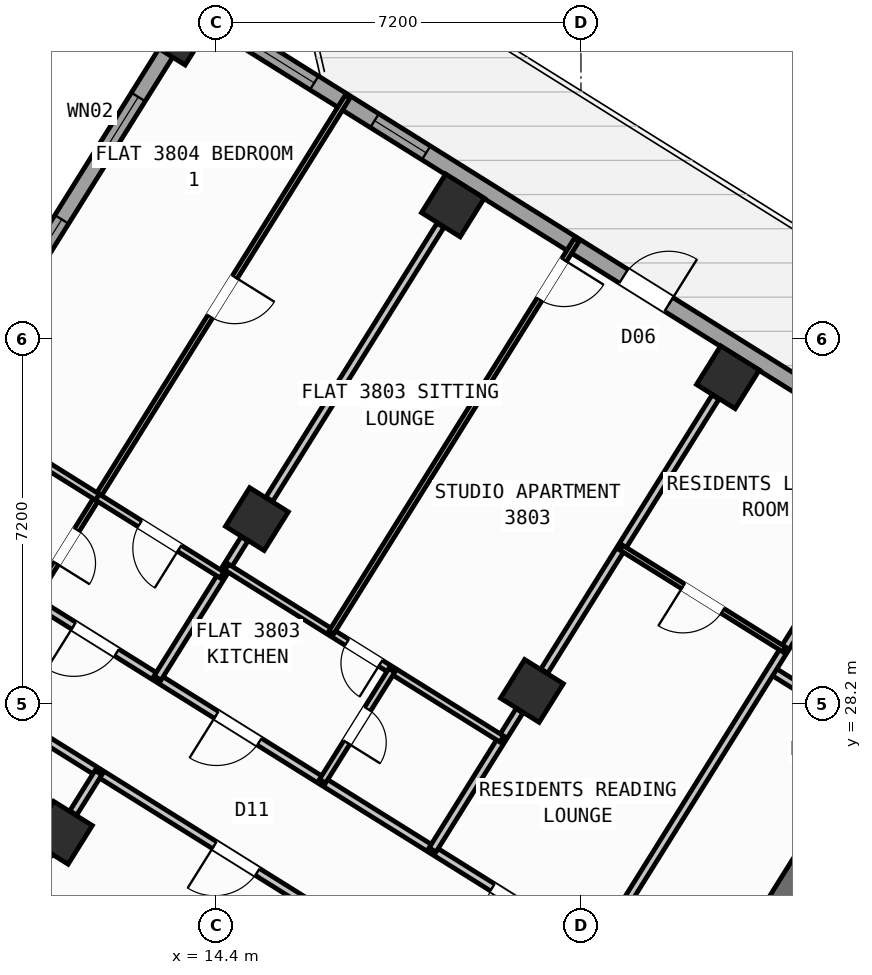
"""IFC4 building model, lengths in metres.
Left out: names, types, materials, properties, quantities, classifications, styles, units other than length and angle.
Written with IfcOpenShell. Run it as: python <this file> out.ifc"""

import sys

from ifc_helpers import new_model, si_unit, direction, frame, frame_2d, origin, origin_2d, place, context, subcontext, project, spatial, rectangle, hollow_rectangle, extrude, source, transform, mapped, element, fill, save


model = new_model("IFC4")
c1 = context("Model", 3, precision=1e-05, world=origin(), true_north=direction((0.0, 1.0)))
c2 = subcontext(c1, "Body", "Model", "MODEL_VIEW")
j1 = project(units=[si_unit("LENGTHUNIT", "METRE"), si_unit("PLANEANGLEUNIT", "RADIAN")], contexts=[c1])
p1 = place(None, origin())
s1 = spatial("IfcSite", under=j1, at=p1, CompositionType="ELEMENT")
p2 = place(p1, origin())
s2 = spatial("IfcBuilding", under=s1, at=p2, CompositionType="ELEMENT")
p3 = place(p2, frame((0.0, 0.0, 151.5)))
s3 = spatial("IfcBuildingStorey", under=s2, at=p3, CompositionType="ELEMENT", Elevation=151.5)
p4 = place(p3, frame((26.007, 24.976, 0.0), z_axis=(0.0, 0.0, 1.0), x_axis=(-0.529923795287, -0.848045264823, 0.0)))
e1 = element("IfcWall", 1, at=p4, inside=s3, PredefinedType="SHEAR", context=c2, shape_type="SweptSolid", body=[
    extrude(rectangle(XDim=6.425, YDim=0.55, at=frame_2d((3.212, 0.0))), origin(), (0.0, 0.0, 1.0), 3.35),
])
m1 = source(origin(), c2, "Body", "SweptSolid", [
    extrude(hollow_rectangle(XDim=0.9, YDim=0.9, WallThickness=0.036, at=origin_2d()), origin(), (0.0, 0.0, 1.0), 3.6),
])
for number, where, z_axis, x_axis in (
    (2, (24.5, 34.643, 0.0), (0.0, 0.0, 1.0), (-0.848, 0.53, 0.0)),
    (3, (20.632, 28.452, 0.0), (0.0, 0.0, 1.0), (-0.848, 0.53, 0.0)),
    (4, (19.073, 38.034, 0.0), (0.0, 0.0, 1.0), (-0.848, 0.53, 0.0)),
    (5, (15.205, 31.844, 0.0), (0.0, 0.0, 1.0), (-0.848, 0.53, 0.0)),
    (6, (11.336, 25.653, 0.0), (0.0, 0.0, 1.0), (-0.848, 0.53, 0.0)),
    (7, (13.646, 41.426, 0.0), (0.0, 0.0, 1.0), (-0.848, 0.53, 0.0)),
):
    element("IfcColumn", number, at=place(p3, frame(where, z_axis=z_axis, x_axis=x_axis)), inside=s3, PredefinedType="COLUMN", context=c2, shape_type="MappedRepresentation", body=[
        mapped(m1, transform((0.0, 0.0, 0.0), scale=1.0)),
    ])
p5 = place(p3, frame((2.415, 23.452, 0.0), z_axis=(0.0, 0.0, 1.0), x_axis=(0.52991049553, 0.848053575387, 0.0)))
e8 = element("IfcWall", 8, at=p5, inside=s3, PredefinedType="STANDARD", context=c2, shape_type="SweptSolid", body=[
    extrude(rectangle(XDim=21.587, YDim=0.32, at=frame_2d((10.794, 0.0))), origin(), (0.0, 0.0, 1.0), 2.775),
])
p6 = place(p5, frame((1.406, 0.0, 0.8)))
e9 = element("IfcOpeningElement", 9, at=p6, cuts=e8, PredefinedType="OPENING", context=c2, shape_type="SweptSolid", body=[
    extrude(rectangle(XDim=2.1, YDim=1.55, at=frame_2d((1.05, 0.775))), frame((0.0, 0.17, 0.0), z_axis=(0.0, -1.0, 0.0), x_axis=(1.0, 0.0, 0.0)), (0.0, 0.0, 1.0), 0.34),
])
p7 = place(p5, frame((10.949, 0.0, 1.0)))
e10 = element("IfcOpeningElement", 10, at=p7, cuts=e8, PredefinedType="OPENING", context=c2, shape_type="SweptSolid", body=[
    extrude(rectangle(XDim=0.9, YDim=1.25, at=frame_2d((0.45, 0.625))), frame((0.0, 0.17, 0.0), z_axis=(0.0, -1.0, 0.0), x_axis=(1.0, 0.0, 0.0)), (0.0, 0.0, 1.0), 0.34),
])
p8 = place(p5, frame((15.369, 0.0, 0.85)))
e11 = element("IfcOpeningElement", 11, at=p8, cuts=e8, PredefinedType="OPENING", context=c2, shape_type="SweptSolid", body=[
    extrude(rectangle(XDim=1.5, YDim=1.5, at=frame_2d((0.75, 0.75))), frame((0.0, 0.17, 0.0), z_axis=(0.0, -1.0, 0.0), x_axis=(1.0, 0.0, 0.0)), (0.0, 0.0, 1.0), 0.34),
])
p9 = place(p5, frame((18.219, 0.0, 0.85)))
e12 = element("IfcOpeningElement", 12, at=p9, cuts=e8, PredefinedType="OPENING", context=c2, shape_type="SweptSolid", body=[
    extrude(rectangle(XDim=1.5, YDim=1.5, at=frame_2d((0.75, 0.75))), frame((0.0, 0.17, 0.0), z_axis=(0.0, -1.0, 0.0), x_axis=(1.0, 0.0, 0.0)), (0.0, 0.0, 1.0), 0.34),
])
p10 = place(p3, frame((14.138, 41.825, 0.0), z_axis=(0.0, 0.0, 1.0), x_axis=(0.848046498049, -0.529921821731, 0.0)))
e13 = element("IfcWall", 13, at=p10, inside=s3, PredefinedType="STANDARD", context=c2, shape_type="SweptSolid", body=[
    extrude(rectangle(XDim=31.588, YDim=0.32, at=frame_2d((15.794, 0.0))), origin(), (0.0, 0.0, 1.0), 3.35),
])
p11 = place(p10, frame((9.792, 0.0, 0.0)))
e14 = element("IfcOpeningElement", 14, at=p11, cuts=e13, PredefinedType="OPENING", context=c2, shape_type="SweptSolid", body=[
    extrude(rectangle(XDim=1.05, YDim=2.15, at=frame_2d((0.525, 1.075))), frame((0.0, 0.17, 0.0), z_axis=(0.0, -1.0, 0.0), x_axis=(1.0, 0.0, 0.0)), (0.0, 0.0, 1.0), 0.34),
])
p12 = place(p10, frame((0.791, 0.0, 0.85)))
e15 = element("IfcOpeningElement", 15, at=p12, cuts=e13, PredefinedType="OPENING", context=c2, shape_type="SweptSolid", body=[
    extrude(rectangle(XDim=1.8, YDim=1.5, at=frame_2d((0.9, 0.75))), frame((0.0, 0.17, 0.0), z_axis=(0.0, -1.0, 0.0), x_axis=(1.0, 0.0, 0.0)), (0.0, 0.0, 1.0), 0.34),
])
p13 = place(p10, frame((3.996, 0.0, 0.95)))
e16 = element("IfcOpeningElement", 16, at=p13, cuts=e13, PredefinedType="OPENING", context=c2, shape_type="SweptSolid", body=[
    extrude(rectangle(XDim=1.2, YDim=1.4, at=frame_2d((0.6, 0.7))), frame((0.0, 0.17, 0.0), z_axis=(0.0, -1.0, 0.0), x_axis=(1.0, 0.0, 0.0)), (0.0, 0.0, 1.0), 0.34),
])
p14 = place(p10, frame((13.874, 0.0, 0.85)))
e17 = element("IfcOpeningElement", 17, at=p14, cuts=e13, PredefinedType="OPENING", context=c2, shape_type="SweptSolid", body=[
    extrude(rectangle(XDim=1.5, YDim=1.5, at=frame_2d((0.75, 0.75))), frame((0.0, 0.17, 0.0), z_axis=(0.0, -1.0, 0.0), x_axis=(1.0, 0.0, 0.0)), (0.0, 0.0, 1.0), 0.34),
])
p15 = place(p10, frame((17.104, 0.0, 1.0)))
e18 = element("IfcOpeningElement", 18, at=p15, cuts=e13, PredefinedType="OPENING", context=c2, shape_type="SweptSolid", body=[
    extrude(rectangle(XDim=0.9, YDim=1.25, at=frame_2d((0.45, 0.625))), frame((0.0, 0.17, 0.0), z_axis=(0.0, -1.0, 0.0), x_axis=(1.0, 0.0, 0.0)), (0.0, 0.0, 1.0), 0.34),
])
p16 = place(p10, frame((22.069, 0.0, 1.0)))
e19 = element("IfcOpeningElement", 19, at=p16, cuts=e13, PredefinedType="OPENING", context=c2, shape_type="SweptSolid", body=[
    extrude(rectangle(XDim=0.9, YDim=1.25, at=frame_2d((0.45, 0.625))), frame((0.0, 0.17, 0.0), z_axis=(0.0, -1.0, 0.0), x_axis=(1.0, 0.0, 0.0)), (0.0, 0.0, 1.0), 0.34),
])
p17 = place(p10, frame((27.519, 0.0, 1.0)))
e20 = element("IfcOpeningElement", 20, at=p17, cuts=e13, PredefinedType="OPENING", context=c2, shape_type="SweptSolid", body=[
    extrude(rectangle(XDim=0.9, YDim=1.25, at=frame_2d((0.45, 0.625))), frame((0.0, 0.17, 0.0), z_axis=(0.0, -1.0, 0.0), x_axis=(1.0, 0.0, 0.0)), (0.0, 0.0, 1.0), 0.34),
])
p18 = place(p3, frame((27.57, 27.478, 0.0), z_axis=(0.0, 0.0, 1.0), x_axis=(-0.848050851465, 0.529914854792, 0.0)))
e21 = element("IfcWall", 21, at=p18, inside=s3, PredefinedType="PARTITIONING", context=c2, shape_type="SweptSolid", body=[
    extrude(rectangle(XDim=2.61, YDim=0.16, at=frame_2d((1.305, 0.0))), origin(), (0.0, 0.0, 1.0), 3.34),
])
p19 = place(p18, frame((0.95, 0.0, 0.0)))
e22 = element("IfcOpeningElement", 22, at=p19, cuts=e21, PredefinedType="OPENING", context=c2, shape_type="SweptSolid", body=[
    extrude(rectangle(XDim=0.86, YDim=2.05, at=frame_2d((0.43, 1.025))), frame((0.0, 0.09, 0.0), z_axis=(0.0, -1.0, 0.0), x_axis=(1.0, 0.0, 0.0)), (0.0, 0.0, 1.0), 0.18),
])
p20 = place(p3, frame((27.953, 33.016, 0.0), z_axis=(0.0, 0.0, 1.0), x_axis=(-0.529905022231, -0.848056995381, 0.0)))
e23 = element("IfcWall", 23, at=p20, inside=s3, PredefinedType="PARTITIONING", context=c2, shape_type="SweptSolid", body=[
    extrude(rectangle(XDim=11.45, YDim=0.16, at=frame_2d((5.725, 0.0))), origin(), (0.0, 0.0, 1.0), 3.34),
])
p21 = place(p3, frame((21.885, 23.306, 0.0), z_axis=(0.0, 0.0, 1.0), x_axis=(-0.848052408131, 0.529912363569, 0.0)))
e24 = element("IfcWall", 24, at=p21, inside=s3, PredefinedType="PARTITIONING", context=c2, shape_type="SweptSolid", body=[
    extrude(rectangle(XDim=16.73, YDim=0.16, at=frame_2d((8.365, 0.0))), origin(), (0.0, 0.0, 1.0), 3.34),
])
p22 = place(p21, frame((1.395, 0.0, 0.0)))
e25 = element("IfcOpeningElement", 25, at=p22, cuts=e24, PredefinedType="OPENING", context=c2, shape_type="SweptSolid", body=[
    extrude(rectangle(XDim=1.0, YDim=2.1, at=frame_2d((0.5, 1.05))), frame((0.0, 0.09, 0.0), z_axis=(0.0, -1.0, 0.0), x_axis=(1.0, 0.0, 0.0)), (0.0, 0.0, 1.0), 0.18),
])
p23 = place(p21, frame((7.82, 0.0, 0.0)))
e26 = element("IfcOpeningElement", 26, at=p23, cuts=e24, PredefinedType="OPENING", context=c2, shape_type="SweptSolid", body=[
    extrude(rectangle(XDim=1.0, YDim=2.1, at=frame_2d((0.5, 1.05))), frame((0.0, 0.09, 0.0), z_axis=(0.0, -1.0, 0.0), x_axis=(1.0, 0.0, 0.0)), (0.0, 0.0, 1.0), 0.18),
])
p24 = place(p21, frame((11.14, 0.0, 0.0)))
e27 = element("IfcOpeningElement", 27, at=p24, cuts=e24, PredefinedType="OPENING", context=c2, shape_type="SweptSolid", body=[
    extrude(rectangle(XDim=1.0, YDim=2.1, at=frame_2d((0.5, 1.05))), frame((0.0, 0.09, 0.0), z_axis=(0.0, -1.0, 0.0), x_axis=(1.0, 0.0, 0.0)), (0.0, 0.0, 1.0), 0.18),
])
p25 = place(p3, frame((20.719, 21.44, 0.0), z_axis=(0.0, 0.0, 1.0), x_axis=(-0.848048310262, 0.529918921593, 0.0)))
e28 = element("IfcWall", 28, at=p25, inside=s3, PredefinedType="PARTITIONING", context=c2, shape_type="SweptSolid", body=[
    extrude(rectangle(XDim=16.73, YDim=0.16, at=frame_2d((8.365, 0.0))), origin(), (0.0, 0.0, 1.0), 3.34),
])
p26 = place(p25, frame((2.22, 0.0, 0.0)))
e29 = element("IfcOpeningElement", 29, at=p26, cuts=e28, PredefinedType="OPENING", context=c2, shape_type="SweptSolid", body=[
    extrude(rectangle(XDim=0.86, YDim=2.05, at=frame_2d((0.43, 1.025))), frame((0.0, 0.09, 0.0), z_axis=(0.0, -1.0, 0.0), x_axis=(1.0, 0.0, 0.0)), (0.0, 0.0, 1.0), 0.18),
])
p27 = place(p25, frame((6.49, 0.0, 0.0)))
e30 = element("IfcOpeningElement", 30, at=p27, cuts=e28, PredefinedType="OPENING", context=c2, shape_type="SweptSolid", body=[
    extrude(rectangle(XDim=1.0, YDim=2.1, at=frame_2d((0.5, 1.05))), frame((0.0, 0.09, 0.0), z_axis=(0.0, -1.0, 0.0), x_axis=(1.0, 0.0, 0.0)), (0.0, 0.0, 1.0), 0.18),
])
p28 = place(p25, frame((14.304, 0.0, 0.0)))
e31 = element("IfcOpeningElement", 31, at=p28, cuts=e28, PredefinedType="OPENING", context=c2, shape_type="SweptSolid", body=[
    extrude(rectangle(XDim=1.0, YDim=2.1, at=frame_2d((0.5, 1.05))), frame((0.0, 0.09, 0.0), z_axis=(0.0, -1.0, 0.0), x_axis=(1.0, 0.0, 0.0)), (0.0, 0.0, 1.0), 0.18),
])
p29 = place(p3, frame((12.078, 26.84, 0.0), z_axis=(0.0, 0.0, 1.0), x_axis=(-0.529952145338, -0.848027548876, 0.0)))
e32 = element("IfcWall", 32, at=p29, inside=s3, PredefinedType="PARTITIONING", context=c2, shape_type="SweptSolid", body=[
    extrude(rectangle(XDim=0.938, YDim=0.16, at=frame_2d((0.469, 0.0))), origin(), (0.0, 0.0, 1.0), 2.775),
])
p30 = place(p3, frame((24.256, 34.251, 0.0), z_axis=(0.0, 0.0, 1.0), x_axis=(-0.529919772691, -0.848047778437, 0.0)))
e33 = element("IfcWall", 33, at=p30, inside=s3, PredefinedType="PARTITIONING", context=c2, shape_type="SweptSolid", body=[
    extrude(rectangle(XDim=6.376, YDim=0.16, at=frame_2d((3.188, 0.0))), origin(), (0.0, 0.0, 1.0), 2.775),
])
p31 = place(p3, frame((20.387, 28.06, 0.0), z_axis=(0.0, 0.0, 1.0), x_axis=(-0.529890499457, -0.848066069705, 0.0)))
e34 = element("IfcWall", 34, at=p31, inside=s3, PredefinedType="PARTITIONING", context=c2, shape_type="SweptSolid", body=[
    extrude(rectangle(XDim=3.238, YDim=0.16, at=frame_2d((1.619, 0.0))), origin(), (0.0, 0.0, 1.0), 2.775),
])
p32 = place(p3, frame((25.612, 29.269, 0.0), z_axis=(0.0, 0.0, 1.0), x_axis=(-0.84803087207, 0.529946827537, 0.0)))
e35 = element("IfcWall", 35, at=p32, inside=s3, PredefinedType="PARTITIONING", context=c2, shape_type="SweptSolid", body=[
    extrude(rectangle(XDim=3.79, YDim=0.11, at=frame_2d((1.895, 0.0))), origin(), (0.0, 0.0, 1.0), 3.34),
])
p33 = place(p32, frame((1.435, 0.0, 0.0)))
e36 = element("IfcOpeningElement", 36, at=p33, cuts=e35, PredefinedType="OPENING", context=c2, shape_type="SweptSolid", body=[
    extrude(rectangle(XDim=0.92, YDim=2.08, at=frame_2d((0.46, 1.04))), frame((0.0, 0.065, 0.0), z_axis=(0.0, -1.0, 0.0), x_axis=(1.0, 0.0, 0.0)), (0.0, 0.0, 1.0), 0.13),
])
p34 = place(p3, frame((18.828, 37.643, 0.0), z_axis=(0.0, 0.0, 1.0), x_axis=(-0.529930102756, -0.848041323399, 0.0)))
e37 = element("IfcWall", 37, at=p34, inside=s3, PredefinedType="PARTITIONING", context=c2, shape_type="SweptSolid", body=[
    extrude(rectangle(XDim=6.376, YDim=0.16, at=frame_2d((3.188, 0.0))), origin(), (0.0, 0.0, 1.0), 2.775),
])
p35 = place(p3, frame((14.96, 31.452, 0.0), z_axis=(0.0, 0.0, 1.0), x_axis=(-0.529924383291, -0.848044897393, 0.0)))
e38 = element("IfcWall", 38, at=p35, inside=s3, PredefinedType="PARTITIONING", context=c2, shape_type="SweptSolid", body=[
    extrude(rectangle(XDim=3.238, YDim=0.16, at=frame_2d((1.619, 0.0))), origin(), (0.0, 0.0, 1.0), 2.775),
])
p36 = place(p3, frame((20.039, 27.502, 0.0), z_axis=(0.0, 0.0, 1.0), x_axis=(-0.848039019877, 0.529933789039, 0.0)))
e39 = element("IfcWall", 39, at=p36, inside=s3, PredefinedType="PLUMBINGWALL", context=c2, shape_type="SweptSolid", body=[
    extrude(rectangle(XDim=6.4, YDim=0.14, at=frame_2d((3.2, 0.0))), origin(), (0.0, 0.0, 1.0), 3.34),
])
p37 = place(p36, frame((2.824, 0.0, 0.0)))
e40 = element("IfcOpeningElement", 40, at=p37, cuts=e39, PredefinedType="OPENING", context=c2, shape_type="SweptSolid", body=[
    extrude(rectangle(XDim=0.78, YDim=2.05, at=frame_2d((0.39, 1.025))), frame((0.0, 0.08, 0.0), z_axis=(0.0, -1.0, 0.0), x_axis=(1.0, 0.0, 0.0)), (0.0, 0.0, 1.0), 0.16),
])
p38 = place(p3, frame((17.867, 28.859, 0.0), z_axis=(0.0, 0.0, 1.0), x_axis=(-0.529913878929, -0.848051461244, 0.0)))
e41 = element("IfcWall", 41, at=p38, inside=s3, PredefinedType="PLUMBINGWALL", context=c2, shape_type="SweptSolid", body=[
    extrude(rectangle(XDim=2.58, YDim=0.14, at=frame_2d((1.29, 0.0))), origin(), (0.0, 0.0, 1.0), 3.34),
])
p39 = place(p38, frame((0.9, 0.0, 0.0)))
e42 = element("IfcOpeningElement", 42, at=p39, cuts=e41, PredefinedType="OPENING", context=c2, shape_type="SweptSolid", body=[
    extrude(rectangle(XDim=0.78, YDim=2.05, at=frame_2d((0.39, 1.025))), frame((0.0, 0.08, 0.0), z_axis=(0.0, -1.0, 0.0), x_axis=(1.0, 0.0, 0.0)), (0.0, 0.0, 1.0), 0.16),
])
p40 = place(p3, frame((21.517, 37.356, 0.0), z_axis=(0.0, 0.0, 1.0), x_axis=(-0.529919705034, -0.848047820713, 0.0)))
e43 = element("IfcWall", 43, at=p40, inside=s3, PredefinedType="PARTITIONING", context=c2, shape_type="SweptSolid", body=[
    extrude(rectangle(XDim=9.14, YDim=0.11, at=frame_2d((4.57, 0.0))), origin(), (0.0, 0.0, 1.0), 3.34),
])
p41 = place(p40, frame((0.47, 0.0, 0.0)))
e44 = element("IfcOpeningElement", 44, at=p41, cuts=e43, PredefinedType="OPENING", context=c2, shape_type="SweptSolid", body=[
    extrude(rectangle(XDim=0.92, YDim=2.08, at=frame_2d((0.46, 1.04))), frame((0.0, 0.065, 0.0), z_axis=(0.0, -1.0, 0.0), x_axis=(1.0, 0.0, 0.0)), (0.0, 0.0, 1.0), 0.13),
])
p42 = place(p3, frame((16.995, 40.182, 0.0), z_axis=(0.0, 0.0, 1.0), x_axis=(-0.529927783988, -0.848042772363, 0.0)))
e45 = element("IfcWall", 45, at=p42, inside=s3, PredefinedType="PARTITIONING", context=c2, shape_type="SweptSolid", body=[
    extrude(rectangle(XDim=11.72, YDim=0.11, at=frame_2d((5.86, 0.0))), origin(), (0.0, 0.0, 1.0), 3.34),
])
p43 = place(p42, frame((10.08, 0.0, 0.0)))
e46 = element("IfcOpeningElement", 46, at=p43, cuts=e45, PredefinedType="OPENING", context=c2, shape_type="SweptSolid", body=[
    extrude(rectangle(XDim=0.78, YDim=2.05, at=frame_2d((0.39, 1.025))), frame((0.0, 0.065, 0.0), z_axis=(0.0, -1.0, 0.0), x_axis=(1.0, 0.0, 0.0)), (0.0, 0.0, 1.0), 0.13),
])
p44 = place(p42, frame((4.2, 0.0, 0.0)))
e47 = element("IfcOpeningElement", 47, at=p44, cuts=e45, PredefinedType="OPENING", context=c2, shape_type="SweptSolid", body=[
    extrude(rectangle(XDim=0.92, YDim=2.08, at=frame_2d((0.46, 1.04))), frame((0.0, 0.065, 0.0), z_axis=(0.0, -1.0, 0.0), x_axis=(1.0, 0.0, 0.0)), (0.0, 0.0, 1.0), 0.13),
])
p45 = place(p3, frame((14.516, 30.741, 0.0), z_axis=(0.0, 0.0, 1.0), x_axis=(-0.848059786386, 0.529900555496, 0.0)))
e48 = element("IfcWall", 48, at=p45, inside=s3, PredefinedType="PLUMBINGWALL", context=c2, shape_type="SweptSolid", body=[
    extrude(rectangle(XDim=2.9, YDim=0.14, at=frame_2d((1.45, 0.0))), origin(), (0.0, 0.0, 1.0), 3.34),
])
p46 = place(p45, frame((0.99, 0.0, 0.0)))
e49 = element("IfcOpeningElement", 49, at=p46, cuts=e48, PredefinedType="OPENING", context=c2, shape_type="SweptSolid", body=[
    extrude(rectangle(XDim=0.92, YDim=2.08, at=frame_2d((0.46, 1.04))), frame((0.0, 0.08, 0.0), z_axis=(0.0, -1.0, 0.0), x_axis=(1.0, 0.0, 0.0)), (0.0, 0.0, 1.0), 0.16),
])
p47 = place(p3, frame((12.056, 32.278, 0.0), z_axis=(0.0, 0.0, 1.0), x_axis=(-0.848039976902, 0.529932257535, 0.0)))
e50 = element("IfcWall", 50, at=p47, inside=s3, PredefinedType="PLUMBINGWALL", context=c2, shape_type="SweptSolid", body=[
    extrude(rectangle(XDim=3.62, YDim=0.14, at=frame_2d((1.81, 0.0))), origin(), (0.0, 0.0, 1.0), 3.34),
])
m2 = source(origin(), c2, "Body", "SweptSolid", [
    extrude(rectangle(XDim=1.05, YDim=2.15, at=frame_2d((0.525, 1.075))), frame((0.0, 0.025, 0.0), z_axis=(0.0, -1.0, 0.0), x_axis=(1.0, 0.0, 0.0)), (0.0, 0.0, 1.0), 0.05),
])
p48 = place(p11, origin())
e51 = element("IfcDoor", 51, at=p48, inside=s3, OperationType="SINGLE_SWING_RIGHT", PredefinedType="DOOR", context=c2, shape_type="MappedRepresentation", body=[
    mapped(m2, transform((0.0, 0.0, 0.0), scale=1.0)),
])
fill(e14, e51)
m3 = source(origin(), c2, "Body", "SweptSolid", [
    extrude(rectangle(XDim=1.5, YDim=1.5, at=frame_2d((0.75, 0.75))), frame((0.0, 0.03, 0.0), z_axis=(0.0, -1.0, 0.0), x_axis=(1.0, 0.0, 0.0)), (0.0, 0.0, 1.0), 0.06),
])
p49 = place(p8, origin())
e52 = element("IfcWindow", 52, at=p49, inside=s3, PartitioningType="SINGLE_PANEL", PredefinedType="WINDOW", context=c2, shape_type="MappedRepresentation", body=[
    mapped(m3, transform((0.0, 0.0, 0.0), scale=1.0)),
])
fill(e11, e52)
p50 = place(p9, origin())
e53 = element("IfcWindow", 53, at=p50, inside=s3, PartitioningType="SINGLE_PANEL", PredefinedType="WINDOW", context=c2, shape_type="MappedRepresentation", body=[
    mapped(m3, transform((0.0, 0.0, 0.0), scale=1.0)),
])
fill(e12, e53)
m4 = source(origin(), c2, "Body", "SweptSolid", [
    extrude(rectangle(XDim=1.8, YDim=1.5, at=frame_2d((0.9, 0.75))), frame((0.0, 0.03, 0.0), z_axis=(0.0, -1.0, 0.0), x_axis=(1.0, 0.0, 0.0)), (0.0, 0.0, 1.0), 0.06),
])
p51 = place(p12, origin())
e54 = element("IfcWindow", 54, at=p51, inside=s3, PartitioningType="SINGLE_PANEL", PredefinedType="WINDOW", context=c2, shape_type="MappedRepresentation", body=[
    mapped(m4, transform((0.0, 0.0, 0.0), scale=1.0)),
])
fill(e15, e54)
m5 = source(origin(), c2, "Body", "SweptSolid", [
    extrude(rectangle(XDim=1.2, YDim=1.4, at=frame_2d((0.6, 0.7))), frame((0.0, 0.03, 0.0), z_axis=(0.0, -1.0, 0.0), x_axis=(1.0, 0.0, 0.0)), (0.0, 0.0, 1.0), 0.06),
])
p52 = place(p13, origin())
e55 = element("IfcWindow", 55, at=p52, inside=s3, PartitioningType="SINGLE_PANEL", PredefinedType="WINDOW", context=c2, shape_type="MappedRepresentation", body=[
    mapped(m5, transform((0.0, 0.0, 0.0), scale=1.0)),
])
fill(e16, e55)
m6 = source(origin(), c2, "Body", "SweptSolid", [
    extrude(rectangle(XDim=1.0, YDim=2.1, at=frame_2d((0.5, 1.05))), frame((0.0, 0.025, 0.0), z_axis=(0.0, -1.0, 0.0), x_axis=(1.0, 0.0, 0.0)), (0.0, 0.0, 1.0), 0.05),
])
p53 = place(p27, origin())
e56 = element("IfcDoor", 56, at=p53, inside=s3, OperationType="SINGLE_SWING_RIGHT", PredefinedType="DOOR", context=c2, shape_type="MappedRepresentation", body=[
    mapped(m6, transform((0.0, 0.0, 0.0), scale=1.0)),
])
fill(e30, e56)
p54 = place(p22, origin())
e57 = element("IfcDoor", 57, at=p54, inside=s3, OperationType="SINGLE_SWING_LEFT", PredefinedType="DOOR", context=c2, shape_type="MappedRepresentation", body=[
    mapped(m6, transform((0.0, 0.0, 0.0), scale=1.0)),
])
fill(e25, e57)
m7 = source(origin(), c2, "Body", "SweptSolid", [
    extrude(rectangle(XDim=0.92, YDim=2.08, at=frame_2d((0.46, 1.04))), frame((0.0, 0.025, 0.0), z_axis=(0.0, -1.0, 0.0), x_axis=(1.0, 0.0, 0.0)), (0.0, 0.0, 1.0), 0.05),
])
p55 = place(p33, origin())
e58 = element("IfcDoor", 58, at=p55, inside=s3, OperationType="SINGLE_SWING_RIGHT", PredefinedType="DOOR", context=c2, shape_type="MappedRepresentation", body=[
    mapped(m7, transform((0.0, 0.0, 0.0), scale=1.0)),
])
fill(e36, e58)
p56 = place(p41, origin())
e59 = element("IfcDoor", 59, at=p56, inside=s3, OperationType="SINGLE_SWING_LEFT", PredefinedType="DOOR", context=c2, shape_type="MappedRepresentation", body=[
    mapped(m7, transform((0.0, 0.0, 0.0), scale=1.0)),
])
fill(e44, e59)
p57 = place(p23, origin())
e60 = element("IfcDoor", 60, at=p57, inside=s3, OperationType="SINGLE_SWING_RIGHT", PredefinedType="DOOR", context=c2, shape_type="MappedRepresentation", body=[
    mapped(m6, transform((0.0, 0.0, 0.0), scale=1.0)),
])
fill(e26, e60)
m8 = source(origin(), c2, "Body", "SweptSolid", [
    extrude(rectangle(XDim=0.78, YDim=2.05, at=frame_2d((0.39, 1.025))), frame((0.0, 0.025, 0.0), z_axis=(0.0, -1.0, 0.0), x_axis=(1.0, 0.0, 0.0)), (0.0, 0.0, 1.0), 0.05),
])
p58 = place(p37, origin())
e61 = element("IfcDoor", 61, at=p58, inside=s3, OperationType="SINGLE_SWING_LEFT", PredefinedType="DOOR", context=c2, shape_type="MappedRepresentation", body=[
    mapped(m8, transform((0.0, 0.0, 0.0), scale=1.0)),
])
fill(e40, e61)
p59 = place(p39, origin())
e62 = element("IfcDoor", 62, at=p59, inside=s3, OperationType="SINGLE_SWING_RIGHT", PredefinedType="DOOR", context=c2, shape_type="MappedRepresentation", body=[
    mapped(m8, transform((0.0, 0.0, 0.0), scale=1.0)),
])
fill(e42, e62)
p60 = place(p24, origin())
e63 = element("IfcDoor", 63, at=p60, inside=s3, OperationType="SINGLE_SWING_RIGHT", PredefinedType="DOOR", context=c2, shape_type="MappedRepresentation", body=[
    mapped(m6, transform((0.0, 0.0, 0.0), scale=1.0)),
])
fill(e27, e63)
p61 = place(p46, origin())
e64 = element("IfcDoor", 64, at=p61, inside=s3, OperationType="SINGLE_SWING_LEFT", PredefinedType="DOOR", context=c2, shape_type="MappedRepresentation", body=[
    mapped(m7, transform((0.0, 0.0, 0.0), scale=1.0)),
])
fill(e49, e64)
p62 = place(p43, origin())
e65 = element("IfcDoor", 65, at=p62, inside=s3, OperationType="SINGLE_SWING_RIGHT", PredefinedType="DOOR", context=c2, shape_type="MappedRepresentation", body=[
    mapped(m8, transform((0.0, 0.0, 0.0), scale=1.0)),
])
fill(e46, e65)
p63 = place(p44, origin())
e66 = element("IfcDoor", 66, at=p63, inside=s3, OperationType="SINGLE_SWING_LEFT", PredefinedType="DOOR", context=c2, shape_type="MappedRepresentation", body=[
    mapped(m7, transform((0.0, 0.0, 0.0), scale=1.0)),
])
fill(e47, e66)
save(model, sys.argv[1])
